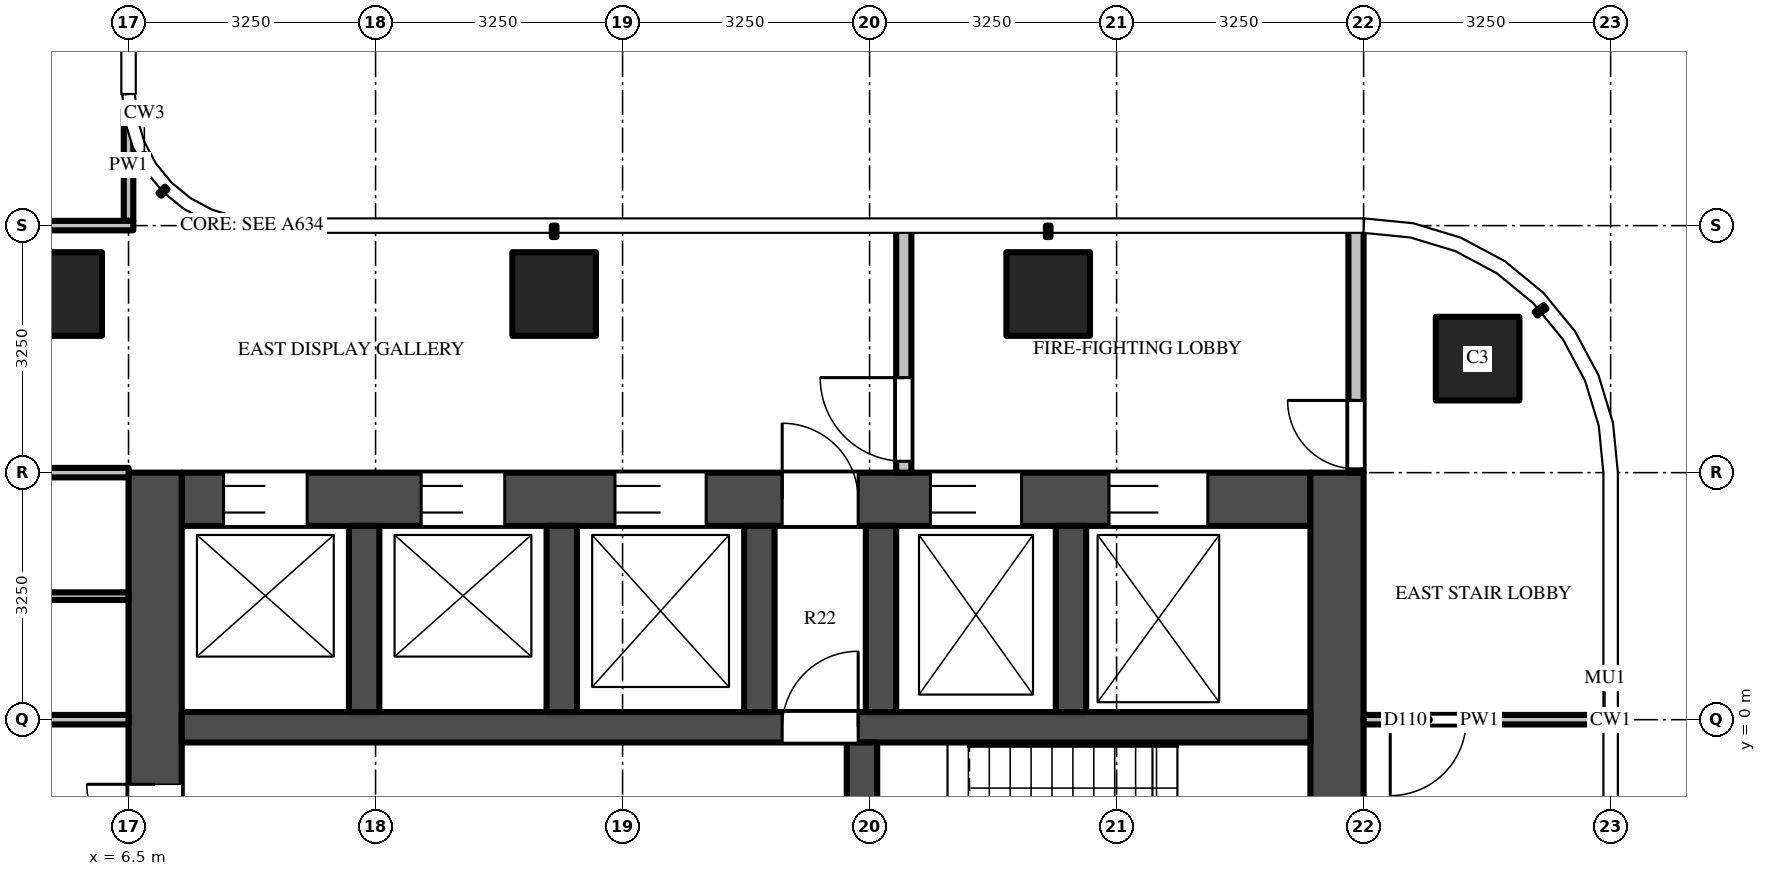
"""IFC4 building model, lengths in metres.
Left out: names, types, materials, properties, quantities, classifications, styles, units other than length and angle.
Written with IfcOpenShell. Run it as: python <this file> out.ifc"""

import sys

from ifc_helpers import new_model, si_unit, direction, frame, frame_2d, origin, origin_2d, place, context, subcontext, project, spatial, rectangle, extrude, source, transform, mapped, element, fill, save


model = new_model("IFC4")
c1 = context("Model", 3, precision=1e-05, world=origin(), true_north=direction((0.0, 1.0)))
c2 = subcontext(c1, "Body", "Model", "MODEL_VIEW")
j1 = project(units=[si_unit("LENGTHUNIT", "METRE"), si_unit("PLANEANGLEUNIT", "RADIAN")], contexts=[c1])
p1 = place(None, origin())
s1 = spatial("IfcSite", under=j1, at=p1, CompositionType="ELEMENT")
p2 = place(p1, origin())
s2 = spatial("IfcBuilding", under=s1, at=p2, CompositionType="ELEMENT")
p3 = place(p2, frame((0.0, 0.0, 267.5)))
s3 = spatial("IfcBuildingStorey", under=s2, at=p3, CompositionType="ELEMENT", Elevation=267.5)
m1 = source(origin(), c2, "Body", "SweptSolid", [
    extrude(rectangle(XDim=1.1, YDim=1.1, at=origin_2d()), origin(), (0.0, 0.0, 1.0), 3.9),
])
for number, where, z_axis, x_axis in (
    (1, (12.1, 5.6, 0.0), (0.0, 0.0, 1.0), (1.0, 0.0, 0.0)),
    (2, (18.6, 5.6, 0.0), (0.0, 0.0, 1.0), (1.0, 0.0, 0.0)),
    (3, (24.25, 4.75, 0.0), (0.0, 0.0, 1.0), (1.0, 0.0, 0.0)),
    (4, (5.6, 5.6, 0.0), (0.0, 0.0, 1.0), (1.0, 0.0, 0.0)),
):
    element("IfcColumn", number, at=place(p3, frame(where, z_axis=z_axis, x_axis=x_axis)), inside=s3, PredefinedType="COLUMN", context=c2, shape_type="MappedRepresentation", body=[
        mapped(m1, transform((0.0, 0.0, 0.0))),
    ])
m2 = source(origin(), c2, "Body", "SweptSolid", [
    extrude(rectangle(XDim=14.85, YDim=0.7, at=frame_2d((7.425, 0.0))), origin(), (0.0, 0.0, 1.0), 3.45),
])
p4 = place(p3, frame((7.2, 2.9, 0.0), z_axis=(0.0, 0.0, 1.0), x_axis=(1.0, 0.0, 0.0)))
e5 = element("IfcWall", 5, at=p4, inside=s3, PredefinedType="SHEAR", context=c2, shape_type="MappedRepresentation", body=[
    mapped(m2, transform((0.0, 0.0, 0.0))),
])
m3 = source(origin(), c2, "Body", "SweptSolid", [
    extrude(rectangle(XDim=1.1, YDim=2.1, at=frame_2d((0.55, 1.05))), frame((0.0, 0.36, 0.0), z_axis=(0.0, -1.0, 0.0), x_axis=(1.0, 0.0, 0.0)), (0.0, 0.0, 1.0), 0.72),
])
p5 = place(p4, frame((0.55, 0.0, 0.0)))
e6 = element("IfcOpeningElement", 6, at=p5, cuts=e5, PredefinedType="OPENING", context=c2, shape_type="MappedRepresentation", body=[
    mapped(m3, transform((0.0, 0.0, 0.0))),
])
p6 = place(p4, frame((3.15, 0.0, 0.0)))
e7 = element("IfcOpeningElement", 7, at=p6, cuts=e5, PredefinedType="OPENING", context=c2, shape_type="MappedRepresentation", body=[
    mapped(m3, transform((0.0, 0.0, 0.0))),
])
m4 = source(origin(), c2, "Body", "SweptSolid", [
    extrude(rectangle(XDim=1.2, YDim=2.1, at=frame_2d((0.6, 1.05))), frame((0.0, 0.36, 0.0), z_axis=(0.0, -1.0, 0.0), x_axis=(1.0, 0.0, 0.0)), (0.0, 0.0, 1.0), 0.72),
])
p7 = place(p4, frame((5.7, 0.0, 0.0)))
e8 = element("IfcOpeningElement", 8, at=p7, cuts=e5, PredefinedType="OPENING", context=c2, shape_type="MappedRepresentation", body=[
    mapped(m4, transform((0.0, 0.0, 0.0))),
])
m5 = source(origin(), c2, "Body", "SweptSolid", [
    extrude(rectangle(XDim=1.3, YDim=2.1, at=frame_2d((0.65, 1.05))), frame((0.0, 0.36, 0.0), z_axis=(0.0, -1.0, 0.0), x_axis=(1.0, 0.0, 0.0)), (0.0, 0.0, 1.0), 0.72),
])
p8 = place(p4, frame((12.2, 0.0, 0.0)))
e9 = element("IfcOpeningElement", 9, at=p8, cuts=e5, PredefinedType="OPENING", context=c2, shape_type="MappedRepresentation", body=[
    mapped(m5, transform((0.0, 0.0, 0.0))),
])
p9 = place(p4, frame((9.85, 0.0, 0.0)))
e10 = element("IfcOpeningElement", 10, at=p9, cuts=e5, PredefinedType="OPENING", context=c2, shape_type="MappedRepresentation", body=[
    mapped(m4, transform((0.0, 0.0, 0.0))),
])
m6 = source(origin(), c2, "Body", "SweptSolid", [
    extrude(rectangle(XDim=1.0, YDim=2.1, at=frame_2d((0.5, 1.05))), frame((0.0, 0.36, 0.0), z_axis=(0.0, -1.0, 0.0), x_axis=(1.0, 0.0, 0.0)), (0.0, 0.0, 1.0), 0.72),
])
p10 = place(p4, frame((7.9, 0.0, 0.0)))
e11 = element("IfcOpeningElement", 11, at=p10, cuts=e5, PredefinedType="OPENING", context=c2, shape_type="MappedRepresentation", body=[
    mapped(m6, transform((0.0, 0.0, 0.0))),
])
m7 = source(origin(), c2, "Body", "SweptSolid", [
    extrude(rectangle(XDim=9.05, YDim=0.7, at=frame_2d((4.525, 0.0))), origin(), (0.0, 0.0, 1.0), 3.45),
])
p11 = place(p3, frame((6.85, -5.8, 0.0), z_axis=(0.0, 0.0, 1.0), x_axis=(0.0, 1.0, 0.0)))
e12 = element("IfcWall", 12, at=p11, inside=s3, PredefinedType="SHEAR", context=c2, shape_type="MappedRepresentation", body=[
    mapped(m7, transform((0.0, 0.0, 0.0))),
])
m8 = source(origin(), c2, "Body", "SweptSolid", [
    extrude(rectangle(XDim=1.8, YDim=2.1, at=frame_2d((0.9, 1.05))), frame((0.0, 0.36, 0.0), z_axis=(0.0, -1.0, 0.0), x_axis=(1.0, 0.0, 0.0)), (0.0, 0.0, 1.0), 0.72),
])
p12 = place(p11, frame((3.15, 0.0, 0.0)))
e13 = element("IfcOpeningElement", 13, at=p12, cuts=e12, PredefinedType="OPENING", context=c2, shape_type="MappedRepresentation", body=[
    mapped(m8, transform((0.0, 0.0, 0.0))),
])
p13 = place(p3, frame((22.4, -5.8, 0.0), z_axis=(0.0, 0.0, 1.0), x_axis=(0.0, 1.0, 0.0)))
e14 = element("IfcWall", 14, at=p13, inside=s3, PredefinedType="SHEAR", context=c2, shape_type="MappedRepresentation", body=[
    mapped(m7, transform((0.0, 0.0, 0.0))),
])
m9 = source(origin(), c2, "Body", "SweptSolid", [
    extrude(rectangle(XDim=14.85, YDim=0.4, at=frame_2d((7.425, 0.0))), origin(), (0.0, 0.0, 1.0), 3.45),
])
p14 = place(p3, frame((7.2, -0.1, 0.0), z_axis=(0.0, 0.0, 1.0), x_axis=(1.0, 0.0, 0.0)))
e15 = element("IfcWall", 15, at=p14, inside=s3, PredefinedType="SHEAR", context=c2, shape_type="MappedRepresentation", body=[
    mapped(m9, transform((0.0, 0.0, 0.0))),
])
m10 = source(origin(), c2, "Body", "SweptSolid", [
    extrude(rectangle(XDim=1.0, YDim=2.1, at=frame_2d((0.5, 1.05))), frame((0.0, 0.21, 0.0), z_axis=(0.0, -1.0, 0.0), x_axis=(1.0, 0.0, 0.0)), (0.0, 0.0, 1.0), 0.42),
])
p15 = place(p14, frame((7.9, 0.0, 0.0)))
e16 = element("IfcOpeningElement", 16, at=p15, cuts=e15, PredefinedType="OPENING", context=c2, shape_type="MappedRepresentation", body=[
    mapped(m10, transform((0.0, 0.0, 0.0))),
])
m11 = source(origin(), c2, "Body", "SweptSolid", [
    extrude(rectangle(XDim=5.5, YDim=0.4, at=frame_2d((2.75, 0.0))), origin(), (0.0, 0.0, 1.0), 3.45),
])
p16 = place(p3, frame((16.15, -5.8, 0.0), z_axis=(0.0, 0.0, 1.0), x_axis=(0.0, 1.0, 0.0)))
e17 = element("IfcWall", 17, at=p16, inside=s3, PredefinedType="SHEAR", context=c2, shape_type="MappedRepresentation", body=[
    mapped(m11, transform((0.0, 0.0, 0.0))),
])
m12 = source(origin(), c2, "Body", "SweptSolid", [
    extrude(rectangle(XDim=1.1, YDim=2.1, at=frame_2d((0.55, 1.05))), frame((0.0, 0.21, 0.0), z_axis=(0.0, -1.0, 0.0), x_axis=(1.0, 0.0, 0.0)), (0.0, 0.0, 1.0), 0.42),
])
p17 = place(p16, frame((0.725, 0.0, 0.0)))
e18 = element("IfcOpeningElement", 18, at=p17, cuts=e17, PredefinedType="OPENING", context=c2, shape_type="MappedRepresentation", body=[
    mapped(m12, transform((0.0, 0.0, 0.0))),
])
p18 = place(p16, frame((3.675, 0.0, 0.0)))
e19 = element("IfcOpeningElement", 19, at=p18, cuts=e17, PredefinedType="OPENING", context=c2, shape_type="MappedRepresentation", body=[
    mapped(m12, transform((0.0, 0.0, 0.0))),
])
m13 = source(origin(), c2, "Body", "SweptSolid", [
    extrude(rectangle(XDim=2.45, YDim=0.4, at=frame_2d((1.225, 0.0))), origin(), (0.0, 0.0, 1.0), 3.45),
])
for number, where, z_axis, x_axis in (
    (20, (9.6, 0.1, 0.0), (0.0, 0.0, 1.0), (0.0, 1.0, 0.0)),
    (21, (12.2, 0.1, 0.0), (0.0, 0.0, 1.0), (0.0, 1.0, 0.0)),
    (22, (14.8, 0.1, 0.0), (0.0, 0.0, 1.0), (0.0, 1.0, 0.0)),
    (23, (16.4, 0.1, 0.0), (0.0, 0.0, 1.0), (0.0, 1.0, 0.0)),
    (24, (18.9, 0.1, 0.0), (0.0, 0.0, 1.0), (0.0, 1.0, 0.0)),
):
    element("IfcWall", number, at=place(p3, frame(where, z_axis=z_axis, x_axis=x_axis)), inside=s3, PredefinedType="SHEAR", context=c2, shape_type="MappedRepresentation", body=[
        mapped(m13, transform((0.0, 0.0, 0.0))),
    ])
m14 = source(origin(), c2, "Body", "SweptSolid", [
    extrude(rectangle(XDim=3.25, YDim=0.2, at=frame_2d((1.625, 0.0))), origin(), (0.0, 0.0, 1.0), 3.45),
])
p19 = place(p3, frame((16.7, 3.25, 0.0), z_axis=(0.0, 0.0, 1.0), x_axis=(0.0, 1.0, 0.0)))
e25 = element("IfcWall", 25, at=p19, inside=s3, PredefinedType="PARTITIONING", context=c2, shape_type="MappedRepresentation", body=[
    mapped(m14, transform((0.0, 0.0, 0.0))),
])
m15 = source(origin(), c2, "Body", "SweptSolid", [
    extrude(rectangle(XDim=1.1, YDim=2.1, at=frame_2d((0.55, 1.05))), frame((0.0, 0.11, 0.0), z_axis=(0.0, -1.0, 0.0), x_axis=(1.0, 0.0, 0.0)), (0.0, 0.0, 1.0), 0.22),
])
p20 = place(p19, frame((0.15, 0.0, 0.0)))
e26 = element("IfcOpeningElement", 26, at=p20, cuts=e25, PredefinedType="OPENING", context=c2, shape_type="MappedRepresentation", body=[
    mapped(m15, transform((0.0, 0.0, 0.0))),
])
p21 = place(p3, frame((22.65, 3.25, 0.0), z_axis=(0.0, 0.0, 1.0), x_axis=(0.0, 1.0, 0.0)))
e27 = element("IfcWall", 27, at=p21, inside=s3, PredefinedType="PARTITIONING", context=c2, shape_type="MappedRepresentation", body=[
    mapped(m14, transform((0.0, 0.0, 0.0))),
])
m16 = source(origin(), c2, "Body", "SweptSolid", [
    extrude(rectangle(XDim=0.9, YDim=2.1, at=frame_2d((0.45, 1.05))), frame((0.0, 0.11, 0.0), z_axis=(0.0, -1.0, 0.0), x_axis=(1.0, 0.0, 0.0)), (0.0, 0.0, 1.0), 0.22),
])
p22 = place(p21, frame((0.05, 0.0, 0.0)))
e28 = element("IfcOpeningElement", 28, at=p22, cuts=e27, PredefinedType="OPENING", context=c2, shape_type="MappedRepresentation", body=[
    mapped(m16, transform((0.0, 0.0, 0.0))),
])
m17 = source(origin(), c2, "Body", "SweptSolid", [
    extrude(rectangle(XDim=1.469, YDim=0.125, at=frame_2d((0.734, 0.0))), origin(), (0.0, 0.0, 1.0), 3.45),
])
p23 = place(p3, frame((6.5, 6.562, 0.0), z_axis=(0.0, 0.0, 1.0), x_axis=(0.0, 1.0, 0.0)))
e29 = element("IfcWall", 29, at=p23, inside=s3, PredefinedType="PARTITIONING", context=c2, shape_type="MappedRepresentation", body=[
    mapped(m17, transform((0.0, 0.0, 0.0))),
])
m18 = source(origin(), c2, "Body", "SweptSolid", [
    extrude(rectangle(XDim=5.363, YDim=0.125, at=frame_2d((2.681, 0.0))), origin(), (0.0, 0.0, 1.0), 2.668),
])
p24 = place(p3, frame((6.5, 0.0, 0.0), z_axis=(0.0, 0.0, 1.0), x_axis=(-1.0, 0.0, 0.0)))
e30 = element("IfcWall", 30, at=p24, inside=s3, PredefinedType="PARTITIONING", context=c2, shape_type="MappedRepresentation", body=[
    mapped(m18, transform((0.0, 0.0, 0.0))),
])
m19 = source(origin(), c2, "Body", "SweptSolid", [
    extrude(rectangle(XDim=1.0, YDim=2.1, at=frame_2d((0.5, 1.05))), frame((0.0, 0.073, 0.0), z_axis=(0.0, -1.0, 0.0), x_axis=(1.0, 0.0, 0.0)), (0.0, 0.0, 1.0), 0.145),
])
p25 = place(p24, frame((3.95, 0.0, 0.0)))
e31 = element("IfcOpeningElement", 31, at=p25, cuts=e30, PredefinedType="OPENING", context=c2, shape_type="MappedRepresentation", body=[
    mapped(m19, transform((0.0, 0.0, 0.0))),
])
p26 = place(p3, frame((25.8, 0.0, 0.0), z_axis=(0.0, 0.0, 1.0), x_axis=(-1.0, 0.0, 0.0)))
e32 = element("IfcWall", 32, at=p26, inside=s3, PredefinedType="PARTITIONING", context=c2, shape_type="SweptSolid", body=[
    extrude(rectangle(XDim=3.05, YDim=0.125, at=frame_2d((1.525, 0.0))), origin(), (0.0, 0.0, 1.0), 2.53),
])
p27 = place(p26, frame((1.7, 0.0, 0.0)))
e33 = element("IfcOpeningElement", 33, at=p27, cuts=e32, PredefinedType="OPENING", context=c2, shape_type="MappedRepresentation", body=[
    mapped(m19, transform((0.0, 0.0, 0.0))),
])
m20 = source(origin(), c2, "Body", "SweptSolid", [
    extrude(rectangle(XDim=5.238, YDim=0.1, at=frame_2d((2.619, 0.0))), origin(), (0.0, 0.0, 1.0), 2.668),
])
p28 = place(p3, frame((1.262, 1.625, 0.0), z_axis=(0.0, 0.0, 1.0), x_axis=(1.0, 0.0, 0.0)))
e34 = element("IfcWall", 34, at=p28, inside=s3, PredefinedType="PARTITIONING", context=c2, shape_type="MappedRepresentation", body=[
    mapped(m20, transform((0.0, 0.0, 0.0))),
])
p29 = place(p3, frame((1.137, 3.25, 0.0), z_axis=(0.0, 0.0, 1.0), x_axis=(1.0, 0.0, 0.0)))
e35 = element("IfcWall", 35, at=p29, inside=s3, PredefinedType="PARTITIONING", context=c2, shape_type="MappedRepresentation", body=[
    mapped(m18, transform((0.0, 0.0, 0.0))),
])
p30 = place(p29, frame((0.413, 0.0, 0.0)))
e36 = element("IfcOpeningElement", 36, at=p30, cuts=e35, PredefinedType="OPENING", context=c2, shape_type="MappedRepresentation", body=[
    mapped(m19, transform((0.0, 0.0, 0.0))),
])
m21 = source(origin(), c2, "Body", "SweptSolid", [
    extrude(rectangle(XDim=5.425, YDim=0.125, at=frame_2d((2.712, 0.0))), origin(), (0.0, 0.0, 1.0), 2.53),
])
p31 = place(p3, frame((1.137, 6.5, 0.0), z_axis=(0.0, 0.0, 1.0), x_axis=(1.0, 0.0, 0.0)))
e37 = element("IfcWall", 37, at=p31, inside=s3, PredefinedType="PARTITIONING", context=c2, shape_type="MappedRepresentation", body=[
    mapped(m21, transform((0.0, 0.0, 0.0))),
])
m22 = source(origin(), c2, "Body", "SweptSolid", [
    extrude(rectangle(XDim=1.1, YDim=2.1, at=frame_2d((0.55, 1.05))), frame((0.0, -0.275, 0.0), z_axis=(0.0, -1.0, 0.0), x_axis=(1.0, 0.0, 0.0)), (0.0, 0.0, 1.0), 0.05),
])
p32 = place(p5, origin())
e38 = element("IfcDoor", 38, at=p32, inside=s3, OperationType="DOUBLE_DOOR_SLIDING", PredefinedType="DOOR", context=c2, shape_type="MappedRepresentation", body=[
    mapped(m22, transform((0.0, 0.0, 0.0))),
])
fill(e6, e38)
p33 = place(p6, origin())
e39 = element("IfcDoor", 39, at=p33, inside=s3, OperationType="DOUBLE_DOOR_SLIDING", PredefinedType="DOOR", context=c2, shape_type="MappedRepresentation", body=[
    mapped(m22, transform((0.0, 0.0, 0.0))),
])
fill(e7, e39)
m23 = source(origin(), c2, "Body", "SweptSolid", [
    extrude(rectangle(XDim=1.2, YDim=2.1, at=frame_2d((0.6, 1.05))), frame((0.0, -0.275, 0.0), z_axis=(0.0, -1.0, 0.0), x_axis=(1.0, 0.0, 0.0)), (0.0, 0.0, 1.0), 0.05),
])
p34 = place(p7, origin())
e40 = element("IfcDoor", 40, at=p34, inside=s3, OperationType="DOUBLE_DOOR_SLIDING", PredefinedType="DOOR", context=c2, shape_type="MappedRepresentation", body=[
    mapped(m23, transform((0.0, 0.0, 0.0))),
])
fill(e8, e40)
m24 = source(origin(), c2, "Body", "SweptSolid", [
    extrude(rectangle(XDim=1.3, YDim=2.1, at=frame_2d((0.65, 1.05))), frame((0.0, -0.275, 0.0), z_axis=(0.0, -1.0, 0.0), x_axis=(1.0, 0.0, 0.0)), (0.0, 0.0, 1.0), 0.05),
])
p35 = place(p8, origin())
e41 = element("IfcDoor", 41, at=p35, inside=s3, OperationType="DOUBLE_DOOR_SLIDING", PredefinedType="DOOR", context=c2, shape_type="MappedRepresentation", body=[
    mapped(m24, transform((0.0, 0.0, 0.0))),
])
fill(e9, e41)
p36 = place(p9, origin())
e42 = element("IfcDoor", 42, at=p36, inside=s3, OperationType="DOUBLE_DOOR_SLIDING", PredefinedType="DOOR", context=c2, shape_type="MappedRepresentation", body=[
    mapped(m23, transform((0.0, 0.0, 0.0))),
])
fill(e10, e42)
m25 = source(origin(), c2, "Body", "SweptSolid", [
    extrude(rectangle(XDim=1.8, YDim=2.1, at=frame_2d((0.9, 1.05))), frame((0.0, -0.275, 0.0), z_axis=(0.0, -1.0, 0.0), x_axis=(1.0, 0.0, 0.0)), (0.0, 0.0, 1.0), 0.05),
])
p37 = place(p12, origin())
e43 = element("IfcDoor", 43, at=p37, inside=s3, OperationType="DOUBLE_DOOR_SINGLE_SWING", PredefinedType="DOOR", context=c2, shape_type="MappedRepresentation", body=[
    mapped(m25, transform((0.0, 0.0, 0.0))),
])
fill(e13, e43)
m26 = source(origin(), c2, "Body", "SweptSolid", [
    extrude(rectangle(XDim=1.0, YDim=2.1, at=frame_2d((0.5, 1.05))), frame((0.0, 0.025, 0.0), z_axis=(0.0, -1.0, 0.0), x_axis=(1.0, 0.0, 0.0)), (0.0, 0.0, 1.0), 0.05),
])
p38 = place(p15, origin())
e44 = element("IfcDoor", 44, at=p38, inside=s3, OperationType="SINGLE_SWING_RIGHT", PredefinedType="DOOR", context=c2, shape_type="MappedRepresentation", body=[
    mapped(m26, transform((0.0, 0.0, 0.0))),
])
fill(e16, e44)
m27 = source(origin(), c2, "Body", "SweptSolid", [
    extrude(rectangle(XDim=1.0, YDim=2.1, at=frame_2d((0.5, 1.05))), frame((0.0, -0.275, 0.0), z_axis=(0.0, -1.0, 0.0), x_axis=(1.0, 0.0, 0.0)), (0.0, 0.0, 1.0), 0.05),
])
p39 = place(p10, origin())
e45 = element("IfcDoor", 45, at=p39, inside=s3, OperationType="SINGLE_SWING_LEFT", PredefinedType="DOOR", context=c2, shape_type="MappedRepresentation", body=[
    mapped(m27, transform((0.0, 0.0, 0.0))),
])
fill(e11, e45)
m28 = source(origin(), c2, "Body", "SweptSolid", [
    extrude(rectangle(XDim=1.1, YDim=2.1, at=frame_2d((0.55, 1.05))), frame((0.0, 0.025, 0.0), z_axis=(0.0, -1.0, 0.0), x_axis=(1.0, 0.0, 0.0)), (0.0, 0.0, 1.0), 0.05),
])
p40 = place(p20, origin())
e46 = element("IfcDoor", 46, at=p40, inside=s3, OperationType="SINGLE_SWING_RIGHT", PredefinedType="DOOR", context=c2, shape_type="MappedRepresentation", body=[
    mapped(m28, transform((0.0, 0.0, 0.0))),
])
fill(e26, e46)
m29 = source(origin(), c2, "Body", "SweptSolid", [
    extrude(rectangle(XDim=0.9, YDim=2.1, at=frame_2d((0.45, 1.05))), frame((0.0, 0.025, 0.0), z_axis=(0.0, -1.0, 0.0), x_axis=(1.0, 0.0, 0.0)), (0.0, 0.0, 1.0), 0.05),
])
p41 = place(p22, origin())
e47 = element("IfcDoor", 47, at=p41, inside=s3, OperationType="SINGLE_SWING_RIGHT", PredefinedType="DOOR", context=c2, shape_type="MappedRepresentation", body=[
    mapped(m29, transform((0.0, 0.0, 0.0))),
])
fill(e28, e47)
p42 = place(p27, origin())
e48 = element("IfcDoor", 48, at=p42, inside=s3, OperationType="SINGLE_SWING_RIGHT", PredefinedType="DOOR", context=c2, shape_type="MappedRepresentation", body=[
    mapped(m26, transform((0.0, 0.0, 0.0))),
])
fill(e33, e48)
save(model, sys.argv[1])
